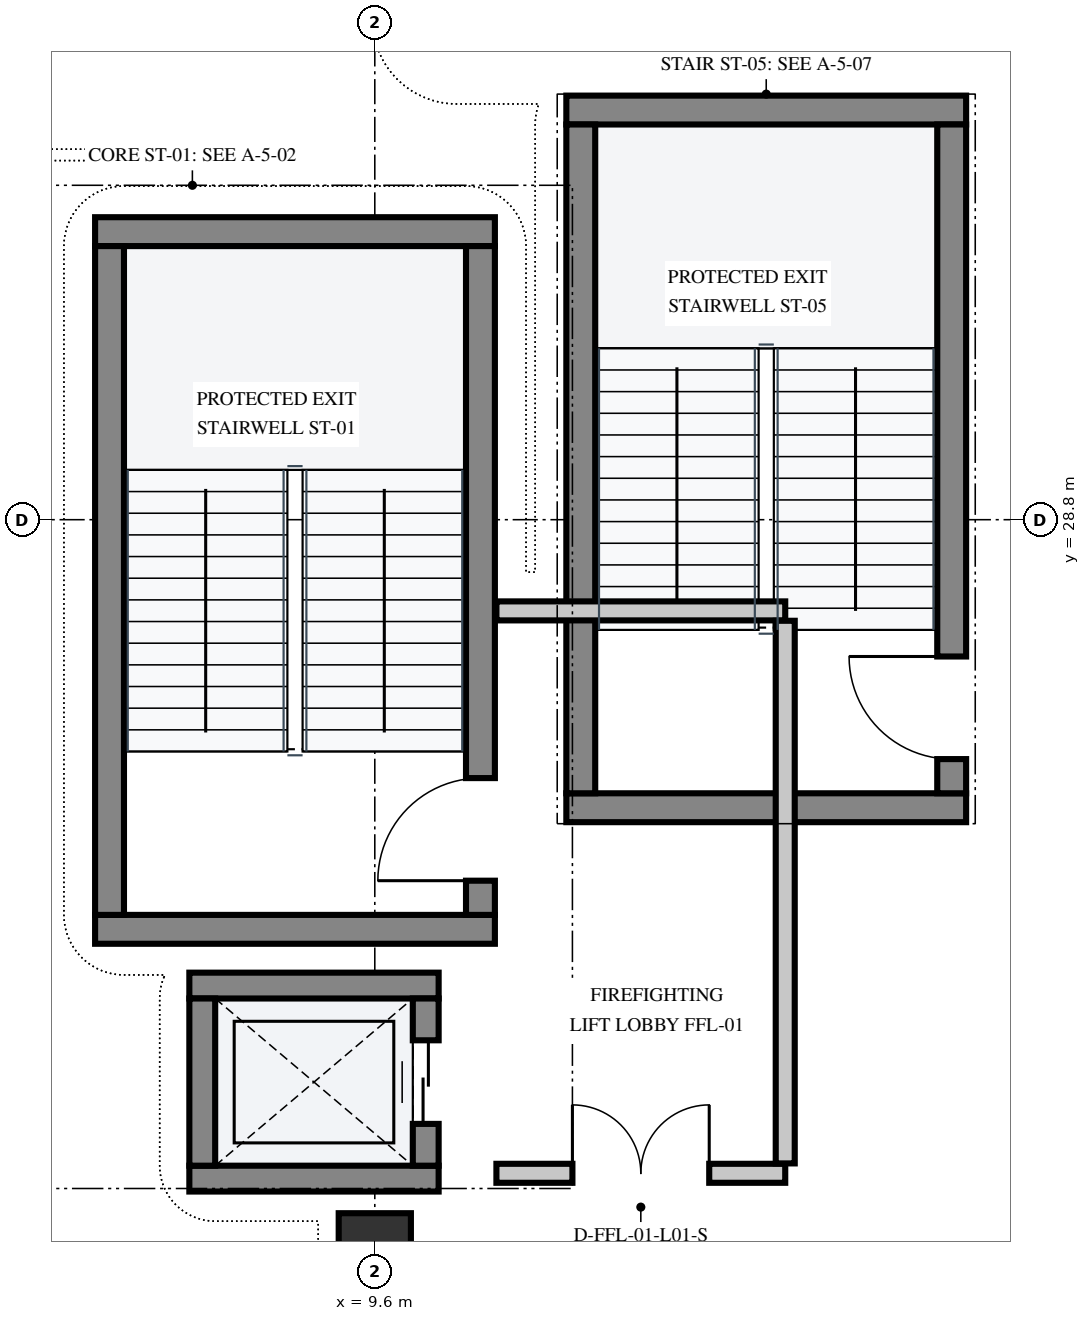
"""IFC4 building model, lengths in metres.
Left out: names, types, materials, properties, quantities, classifications, styles, units other than length and angle.
Written with IfcOpenShell. Run it as: python <this file> out.ifc"""

import sys

from ifc_helpers import new_model, si_unit, direction, frame, frame_2d, origin, origin_2d, place, context, subcontext, project, spatial, rectangle, extrude, element, fill, save


model = new_model("IFC4")
c1 = context("Model", 3, precision=1e-05, world=origin(), true_north=direction((0.0, 1.0)))
c2 = subcontext(c1, "Body", "Model", "MODEL_VIEW")
j1 = project(units=[si_unit("LENGTHUNIT", "METRE"), si_unit("PLANEANGLEUNIT", "RADIAN")], contexts=[c1])
p1 = place(None, origin())
s1 = spatial("IfcSite", under=j1, at=p1, CompositionType="ELEMENT")
p2 = place(p1, origin())
s2 = spatial("IfcBuilding", under=s1, at=p2, CompositionType="ELEMENT")
p3 = place(p2, frame((0.0, 0.0, 5.4)))
s3 = spatial("IfcBuildingStorey", under=s2, at=p3, CompositionType="ELEMENT", Elevation=5.4)
p4 = place(p3, frame((9.6, 19.2, 0.0), z_axis=(0.0, 0.0, 1.0), x_axis=(1.0, 0.0, 0.0)))
e1 = element("IfcColumn", 1, at=p4, inside=s3, PredefinedType="COLUMN", context=c2, shape_type="SweptSolid", body=[
    extrude(rectangle(XDim=0.95, YDim=0.95, at=origin_2d()), origin(), (0.0, 0.0, 1.0), 4.8),
])
for number, where, z_axis, x_axis in (
    (2, (5.92, 23.41, 0.0), (0.0, 0.0, 1.0), (1.0, 0.0, 0.0)),
    (3, (5.92, 32.59, 0.0), (0.0, 0.0, 1.0), (1.0, 0.0, 0.0)),
):
    element("IfcWall", number, at=place(p3, frame(where, z_axis=z_axis, x_axis=x_axis)), inside=s3, PredefinedType="SHEAR", context=c2, shape_type="SweptSolid", body=[
        extrude(rectangle(XDim=5.26, YDim=0.38, at=frame_2d((2.63, 0.0))), origin(), (0.0, 0.0, 1.0), 4.505),
    ])
p5 = place(p3, frame((10.99, 23.6, 0.0), z_axis=(0.0, 0.0, 1.0), x_axis=(0.0, 1.0, 0.0)))
e4 = element("IfcWall", 4, at=p5, inside=s3, PredefinedType="SHEAR", context=c2, shape_type="SweptSolid", body=[
    extrude(rectangle(XDim=8.8, YDim=0.38, at=frame_2d((4.4, 0.0))), origin(), (0.0, 0.0, 1.0), 4.505),
])
p6 = place(p5, frame((0.45, 0.0, 0.0)))
e5 = element("IfcOpeningElement", 5, at=p6, cuts=e4, PredefinedType="OPENING", context=c2, shape_type="SweptSolid", body=[
    extrude(rectangle(XDim=1.35, YDim=2.2, at=frame_2d((0.675, 1.1))), frame((0.0, 0.202, 0.0), z_axis=(0.0, -1.0, 0.0), x_axis=(1.0, 0.0, 0.0)), (0.0, 0.0, 1.0), 0.404),
])
p7 = place(p3, frame((6.11, 23.6, 0.0), z_axis=(0.0, 0.0, 1.0), x_axis=(0.0, 1.0, 0.0)))
e6 = element("IfcWall", 6, at=p7, inside=s3, PredefinedType="SHEAR", context=c2, shape_type="SweptSolid", body=[
    extrude(rectangle(XDim=8.8, YDim=0.38, at=frame_2d((4.4, 0.0))), origin(), (0.0, 0.0, 1.0), 4.505),
])
for number, where, z_axis, x_axis in (
    (7, (12.12, 25.01, 0.0), (0.0, 0.0, 1.0), (1.0, 0.0, 0.0)),
    (8, (12.12, 34.19, 0.0), (0.0, 0.0, 1.0), (1.0, 0.0, 0.0)),
):
    element("IfcWall", number, at=place(p3, frame(where, z_axis=z_axis, x_axis=x_axis)), inside=s3, PredefinedType="SHEAR", context=c2, shape_type="SweptSolid", body=[
        extrude(rectangle(XDim=5.26, YDim=0.38, at=frame_2d((2.63, 0.0))), origin(), (0.0, 0.0, 1.0), 4.505),
    ])
p8 = place(p3, frame((17.19, 25.2, 0.0), z_axis=(0.0, 0.0, 1.0), x_axis=(0.0, 1.0, 0.0)))
e9 = element("IfcWall", 9, at=p8, inside=s3, PredefinedType="SHEAR", context=c2, shape_type="SweptSolid", body=[
    extrude(rectangle(XDim=8.8, YDim=0.38, at=frame_2d((4.4, 0.0))), origin(), (0.0, 0.0, 1.0), 4.505),
])
p9 = place(p8, frame((0.45, 0.0, 0.0)))
e10 = element("IfcOpeningElement", 10, at=p9, cuts=e9, PredefinedType="OPENING", context=c2, shape_type="SweptSolid", body=[
    extrude(rectangle(XDim=1.35, YDim=2.2, at=frame_2d((0.675, 1.1))), frame((0.0, 0.202, 0.0), z_axis=(0.0, -1.0, 0.0), x_axis=(1.0, 0.0, 0.0)), (0.0, 0.0, 1.0), 0.404),
])
p10 = place(p3, frame((12.31, 25.2, 0.0), z_axis=(0.0, 0.0, 1.0), x_axis=(0.0, 1.0, 0.0)))
e11 = element("IfcWall", 11, at=p10, inside=s3, PredefinedType="SHEAR", context=c2, shape_type="SweptSolid", body=[
    extrude(rectangle(XDim=8.8, YDim=0.38, at=frame_2d((4.4, 0.0))), origin(), (0.0, 0.0, 1.0), 4.505),
])
for number, where, z_axis, x_axis in (
    (12, (7.16, 20.13, 0.0), (0.0, 0.0, 1.0), (1.0, 0.0, 0.0)),
    (13, (7.16, 22.67, 0.0), (0.0, 0.0, 1.0), (1.0, 0.0, 0.0)),
):
    element("IfcWall", number, at=place(p3, frame(where, z_axis=z_axis, x_axis=x_axis)), inside=s3, PredefinedType="SHEAR", context=c2, shape_type="SweptSolid", body=[
        extrude(rectangle(XDim=3.28, YDim=0.34, at=frame_2d((1.64, 0.0))), origin(), (0.0, 0.0, 1.0), 4.505),
    ])
p11 = place(p3, frame((7.33, 20.3, 0.0), z_axis=(0.0, 0.0, 1.0), x_axis=(0.0, 1.0, 0.0)))
e14 = element("IfcWall", 14, at=p11, inside=s3, PredefinedType="SHEAR", context=c2, shape_type="SweptSolid", body=[
    extrude(rectangle(XDim=2.2, YDim=0.34, at=frame_2d((1.1, 0.0))), origin(), (0.0, 0.0, 1.0), 4.505),
])
p12 = place(p3, frame((10.27, 20.3, 0.0), z_axis=(0.0, 0.0, 1.0), x_axis=(0.0, 1.0, 0.0)))
e15 = element("IfcWall", 15, at=p12, inside=s3, PredefinedType="SHEAR", context=c2, shape_type="SweptSolid", body=[
    extrude(rectangle(XDim=2.2, YDim=0.34, at=frame_2d((1.1, 0.0))), origin(), (0.0, 0.0, 1.0), 4.505),
])
p13 = place(p12, frame((0.55, 0.0, 0.0)))
e16 = element("IfcOpeningElement", 16, at=p13, cuts=e15, PredefinedType="OPENING", context=c2, shape_type="SweptSolid", body=[
    extrude(rectangle(XDim=1.1, YDim=2.15, at=frame_2d((0.55, 1.075))), frame((0.0, 0.182, 0.0), z_axis=(0.0, -1.0, 0.0), x_axis=(1.0, 0.0, 0.0)), (0.0, 0.0, 1.0), 0.364),
])
p14 = place(p3, frame((11.2, 20.2, 0.0), z_axis=(0.0, 0.0, 1.0), x_axis=(1.0, 0.0, 0.0)))
e17 = element("IfcWall", 17, at=p14, inside=s3, PredefinedType="PARTITIONING", context=c2, shape_type="SweptSolid", body=[
    extrude(rectangle(XDim=3.8, YDim=0.25, at=frame_2d((1.9, 0.0))), origin(), (0.0, 0.0, 1.0), 4.505),
])
p15 = place(p14, frame((1.0, 0.0, 0.0)))
e18 = element("IfcOpeningElement", 18, at=p15, cuts=e17, PredefinedType="OPENING", context=c2, shape_type="SweptSolid", body=[
    extrude(rectangle(XDim=1.8, YDim=2.25, at=frame_2d((0.9, 1.125))), frame((0.0, 0.137, 0.0), z_axis=(0.0, -1.0, 0.0), x_axis=(1.0, 0.0, 0.0)), (0.0, 0.0, 1.0), 0.274),
])
p16 = place(p3, frame((11.2, 27.6, 0.0), z_axis=(0.0, 0.0, 1.0), x_axis=(1.0, 0.0, 0.0)))
e19 = element("IfcWall", 19, at=p16, inside=s3, PredefinedType="PARTITIONING", context=c2, shape_type="SweptSolid", body=[
    extrude(rectangle(XDim=3.8, YDim=0.25, at=frame_2d((1.9, 0.0))), origin(), (0.0, 0.0, 1.0), 4.505),
])
p17 = place(p3, frame((15.0, 20.33, 0.0), z_axis=(0.0, 0.0, 1.0), x_axis=(0.0, 1.0, 0.0)))
e20 = element("IfcWall", 20, at=p17, inside=s3, PredefinedType="PARTITIONING", context=c2, shape_type="SweptSolid", body=[
    extrude(rectangle(XDim=7.14, YDim=0.25, at=frame_2d((3.57, 0.0))), origin(), (0.0, 0.0, 1.0), 4.505),
])
p18 = place(p6, origin())
e21 = element("IfcDoor", 21, at=p18, inside=s3, OperationType="SINGLE_SWING_LEFT", PredefinedType="DOOR", context=c2, shape_type="SweptSolid", body=[
    extrude(rectangle(XDim=1.35, YDim=2.2, at=frame_2d((0.675, 1.1))), frame((0.0, 0.025, 0.0), z_axis=(0.0, -1.0, 0.0), x_axis=(1.0, 0.0, 0.0)), (0.0, 0.0, 1.0), 0.05),
])
fill(e5, e21)
p19 = place(p9, origin())
e22 = element("IfcDoor", 22, at=p19, inside=s3, OperationType="SINGLE_SWING_RIGHT", PredefinedType="DOOR", context=c2, shape_type="SweptSolid", body=[
    extrude(rectangle(XDim=1.35, YDim=2.2, at=frame_2d((0.675, 1.1))), frame((0.0, 0.025, 0.0), z_axis=(0.0, -1.0, 0.0), x_axis=(1.0, 0.0, 0.0)), (0.0, 0.0, 1.0), 0.05),
])
fill(e10, e22)
p20 = place(p13, origin())
e23 = element("IfcDoor", 23, at=p20, inside=s3, OperationType="DOUBLE_DOOR_SLIDING", PredefinedType="DOOR", context=c2, shape_type="SweptSolid", body=[
    extrude(rectangle(XDim=1.1, YDim=2.15, at=frame_2d((0.55, 1.075))), frame((0.0, 0.025, 0.0), z_axis=(0.0, -1.0, 0.0), x_axis=(1.0, 0.0, 0.0)), (0.0, 0.0, 1.0), 0.05),
])
fill(e16, e23)
p21 = place(p15, origin())
e24 = element("IfcDoor", 24, at=p21, inside=s3, OperationType="DOUBLE_DOOR_SINGLE_SWING", PredefinedType="DOOR", context=c2, shape_type="SweptSolid", body=[
    extrude(rectangle(XDim=1.8, YDim=2.25, at=frame_2d((0.9, 1.125))), frame((0.0, 0.025, 0.0), z_axis=(0.0, -1.0, 0.0), x_axis=(1.0, 0.0, 0.0)), (0.0, 0.0, 1.0), 0.05),
])
fill(e18, e24)
save(model, sys.argv[1])
